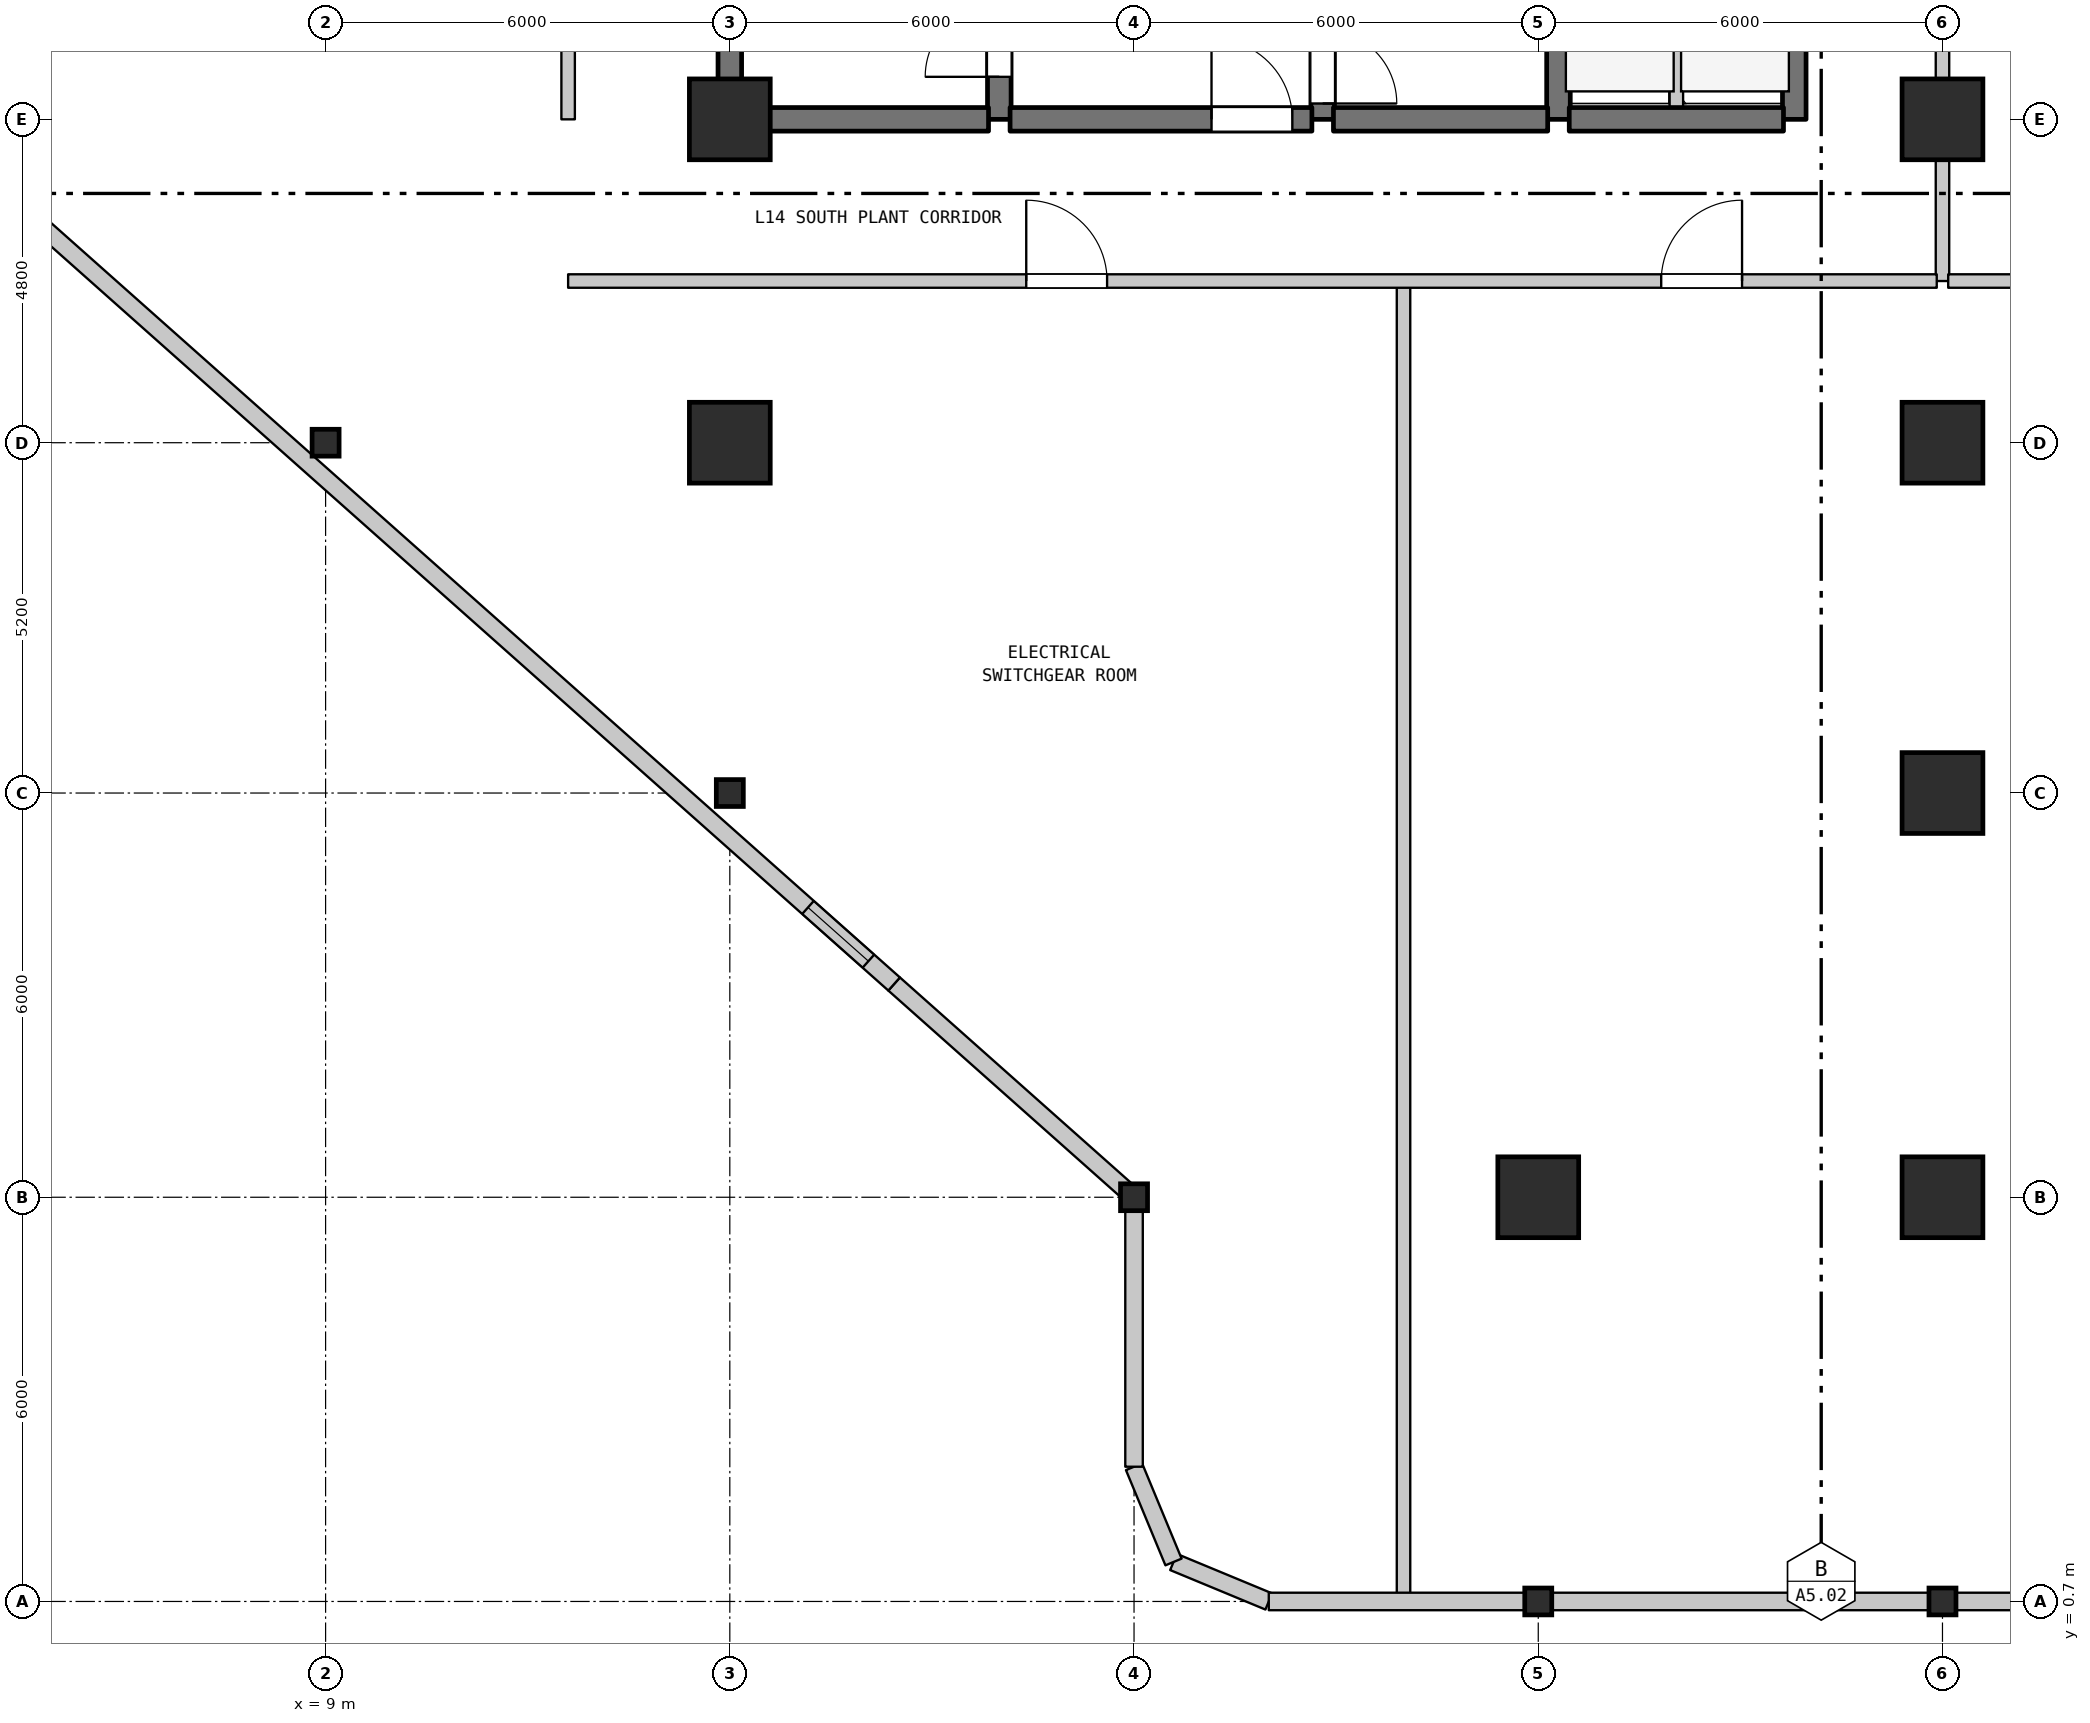
"""IFC4 building model, lengths in metres.
Left out: names, types, materials, properties, quantities, classifications, styles, units other than length and angle.
Written with IfcOpenShell. Run it as: python <this file> out.ifc"""

import sys

from ifc_helpers import new_model, si_unit, direction, frame, frame_2d, origin, origin_2d, place, context, subcontext, project, spatial, rectangle, i_section, extrude, element, fill, save


model = new_model("IFC4")
c1 = context("Model", 3, precision=1e-05, world=origin(), true_north=direction((0.0, 1.0)))
c2 = subcontext(c1, "Body", "Model", "MODEL_VIEW")
j1 = project(units=[si_unit("LENGTHUNIT", "METRE"), si_unit("PLANEANGLEUNIT", "RADIAN")], contexts=[c1])
p1 = place(None, origin())
s1 = spatial("IfcSite", under=j1, at=p1, CompositionType="ELEMENT")
p2 = place(p1, origin())
s2 = spatial("IfcBuilding", under=s1, at=p2, CompositionType="ELEMENT")
p3 = place(p2, frame((0.0, 0.0, 61.0)))
s3 = spatial("IfcBuildingStorey", under=s2, at=p3, CompositionType="ELEMENT", Elevation=61.0)
for number, where, z_axis, x_axis in (
    (1, (9.0, 17.9, 0.0), (0.0, 0.0, 1.0), (1.0, 0.0, 0.0)),
    (2, (15.0, 12.7, 0.0), (0.0, 0.0, 1.0), (1.0, 0.0, 0.0)),
):
    element("IfcColumn", number, at=place(p3, frame(where, z_axis=z_axis, x_axis=x_axis)), inside=s3, PredefinedType="COLUMN", context=c2, shape_type="SweptSolid", body=[
        extrude(i_section(OverallWidth=0.401, OverallDepth=0.399, WebThickness=0.025, FlangeThickness=0.04, FilletRadius=0.015, at=origin_2d()), origin(), (0.0, 0.0, 1.0), 4.6),
    ])
for number, where, z_axis, x_axis in (
    (3, (15.0, 17.9, 0.0), (0.0, 0.0, 1.0), (1.0, 0.0, 0.0)),
    (4, (15.0, 22.7, 0.0), (0.0, 0.0, 1.0), (1.0, 0.0, 0.0)),
):
    element("IfcColumn", number, at=place(p3, frame(where, z_axis=z_axis, x_axis=x_axis)), inside=s3, PredefinedType="COLUMN", context=c2, shape_type="SweptSolid", body=[
        extrude(rectangle(XDim=1.2, YDim=1.2, at=origin_2d()), origin(), (0.0, 0.0, 1.0), 4.6),
    ])
for number, where, z_axis, x_axis in (
    (5, (21.0, 6.7, 0.0), (0.0, 0.0, 1.0), (1.0, 0.0, 0.0)),
    (6, (27.0, 0.7, 0.0), (0.0, 0.0, 1.0), (1.0, 0.0, 0.0)),
):
    element("IfcColumn", number, at=place(p3, frame(where, z_axis=z_axis, x_axis=x_axis)), inside=s3, PredefinedType="COLUMN", context=c2, shape_type="SweptSolid", body=[
        extrude(i_section(OverallWidth=0.401, OverallDepth=0.399, WebThickness=0.025, FlangeThickness=0.04, FilletRadius=0.015, at=origin_2d()), origin(), (0.0, 0.0, 1.0), 4.6),
    ])
p4 = place(p3, frame((27.0, 6.7, 0.0), z_axis=(0.0, 0.0, 1.0), x_axis=(1.0, 0.0, 0.0)))
e7 = element("IfcColumn", 7, at=p4, inside=s3, PredefinedType="COLUMN", context=c2, shape_type="SweptSolid", body=[
    extrude(rectangle(XDim=1.2, YDim=1.2, at=origin_2d()), origin(), (0.0, 0.0, 1.0), 4.6),
])
p5 = place(p3, frame((33.0, 0.7, 0.0), z_axis=(0.0, 0.0, 1.0), x_axis=(1.0, 0.0, 0.0)))
e8 = element("IfcColumn", 8, at=p5, inside=s3, PredefinedType="COLUMN", context=c2, shape_type="SweptSolid", body=[
    extrude(i_section(OverallWidth=0.401, OverallDepth=0.399, WebThickness=0.025, FlangeThickness=0.04, FilletRadius=0.015, at=origin_2d()), origin(), (0.0, 0.0, 1.0), 4.6),
])
for number, where, z_axis, x_axis in (
    (9, (33.0, 6.7, 0.0), (0.0, 0.0, 1.0), (1.0, 0.0, 0.0)),
    (10, (33.0, 12.7, 0.0), (0.0, 0.0, 1.0), (1.0, 0.0, 0.0)),
    (11, (33.0, 17.9, 0.0), (0.0, 0.0, 1.0), (1.0, 0.0, 0.0)),
    (12, (33.0, 22.7, 0.0), (0.0, 0.0, 1.0), (1.0, 0.0, 0.0)),
):
    element("IfcColumn", number, at=place(p3, frame(where, z_axis=z_axis, x_axis=x_axis)), inside=s3, PredefinedType="COLUMN", context=c2, shape_type="SweptSolid", body=[
        extrude(rectangle(XDim=1.2, YDim=1.2, at=origin_2d()), origin(), (0.0, 0.0, 1.0), 4.6),
    ])
p6 = place(p3, frame((21.0, 6.7, 0.0), z_axis=(0.0, 0.0, 1.0), x_axis=(-0.74741780008, 0.664354297137, 0.0)))
e13 = element("IfcWall", 13, at=p6, inside=s3, PredefinedType="STANDARD", context=c2, shape_type="SweptSolid", body=[
    extrude(rectangle(XDim=4.764, YDim=0.26, at=frame_2d((2.382, 0.0))), origin(), (0.0, 0.0, 1.0), 3.88),
])
for number, where, z_axis, x_axis in (
    (14, (23.0, 0.7, 0.0), (0.0, 0.0, 1.0), (-0.924, 0.383, 0.0)),
    (15, (21.586, 1.286, 0.0), (0.0, 0.0, 1.0), (-0.383, 0.924, 0.0)),
):
    element("IfcWall", number, at=place(p3, frame(where, z_axis=z_axis, x_axis=x_axis)), inside=s3, PredefinedType="STANDARD", context=c2, shape_type="SweptSolid", body=[
        extrude(rectangle(XDim=1.531, YDim=0.26, at=frame_2d((0.765, 0.0))), origin(), (0.0, 0.0, 1.0), 4.28),
    ])
p7 = place(p3, frame((21.0, 2.7, 0.0), z_axis=(0.0, 0.0, 1.0), x_axis=(0.0, 1.0, 0.0)))
e16 = element("IfcWall", 16, at=p7, inside=s3, PredefinedType="STANDARD", context=c2, shape_type="SweptSolid", body=[
    extrude(rectangle(XDim=4.0, YDim=0.26, at=frame_2d((2.0, 0.0))), origin(), (0.0, 0.0, 1.0), 4.28),
])
p8 = place(p3, frame((12.6, 22.7, 0.0), z_axis=(0.0, 0.0, 1.0), x_axis=(0.0, 1.0, 0.0)))
e17 = element("IfcWall", 17, at=p8, inside=s3, PredefinedType="STANDARD", context=c2, shape_type="SweptSolid", body=[
    extrude(rectangle(XDim=15.2, YDim=0.2, at=frame_2d((7.6, 0.0))), origin(), (0.0, 0.0, 1.0), 4.28),
])
p9 = place(p8, frame((7.0, 0.0, 0.0)))
e18 = element("IfcOpeningElement", 18, at=p9, cuts=e17, PredefinedType="OPENING", context=c2, shape_type="SweptSolid", body=[
    extrude(rectangle(XDim=1.2, YDim=2.2, at=frame_2d((0.6, 1.1))), frame((0.0, 0.11, 0.0), z_axis=(0.0, -1.0, 0.0), x_axis=(1.0, 0.0, 0.0)), (0.0, 0.0, 1.0), 0.22),
])
p10 = place(p3, frame((15.0, 22.7, 0.0), z_axis=(0.0, 0.0, 1.0), x_axis=(0.0, 1.0, 0.0)))
e19 = element("IfcWall", 19, at=p10, inside=s3, PredefinedType="SHEAR", context=c2, shape_type="SweptSolid", body=[
    extrude(rectangle(XDim=6.8, YDim=0.35, at=frame_2d((3.4, 0.0))), origin(), (0.0, 0.0, 1.0), 4.28),
])
p11 = place(p3, frame((19.0, 22.7, 0.0), z_axis=(0.0, 0.0, 1.0), x_axis=(0.0, 1.0, 0.0)))
e20 = element("IfcWall", 20, at=p11, inside=s3, PredefinedType="SHEAR", context=c2, shape_type="SweptSolid", body=[
    extrude(rectangle(XDim=5.5, YDim=0.35, at=frame_2d((2.75, 0.0))), origin(), (0.0, 0.0, 1.0), 4.28),
])
p12 = place(p11, frame((0.631, 0.0, 0.0)))
e21 = element("IfcOpeningElement", 21, at=p12, cuts=e20, PredefinedType="OPENING", context=c2, shape_type="SweptSolid", body=[
    extrude(rectangle(XDim=1.1, YDim=2.15, at=frame_2d((0.55, 1.075))), frame((0.0, 0.185, 0.0), z_axis=(0.0, -1.0, 0.0), x_axis=(1.0, 0.0, 0.0)), (0.0, 0.0, 1.0), 0.37),
])
p13 = place(p3, frame((23.8, 22.7, 0.0), z_axis=(0.0, 0.0, 1.0), x_axis=(0.0, 1.0, 0.0)))
e22 = element("IfcWall", 22, at=p13, inside=s3, PredefinedType="SHEAR", context=c2, shape_type="SweptSolid", body=[
    extrude(rectangle(XDim=5.5, YDim=0.35, at=frame_2d((2.75, 0.0))), origin(), (0.0, 0.0, 1.0), 4.28),
])
p14 = place(p13, frame((0.235, 0.0, 0.0)))
e23 = element("IfcOpeningElement", 23, at=p14, cuts=e22, PredefinedType="OPENING", context=c2, shape_type="SweptSolid", body=[
    extrude(rectangle(XDim=1.1, YDim=2.15, at=frame_2d((0.55, 1.075))), frame((0.0, 0.185, 0.0), z_axis=(0.0, -1.0, 0.0), x_axis=(1.0, 0.0, 0.0)), (0.0, 0.0, 1.0), 0.37),
])
p15 = place(p3, frame((25.0, 0.71, 0.0), z_axis=(0.0, 0.0, 1.0), x_axis=(0.0, 1.0, 0.0)))
e24 = element("IfcWall", 24, at=p15, inside=s3, PredefinedType="STANDARD", context=c2, shape_type="SweptSolid", body=[
    extrude(rectangle(XDim=19.59, YDim=0.2, at=frame_2d((9.795, 0.0))), origin(), (0.0, 0.0, 1.0), 4.28),
])
p16 = place(p3, frame((27.3, 22.7, 0.0), z_axis=(0.0, 0.0, 1.0), x_axis=(0.0, 1.0, 0.0)))
e25 = element("IfcWall", 25, at=p16, inside=s3, PredefinedType="SHEAR", context=c2, shape_type="SweptSolid", body=[
    extrude(rectangle(XDim=2.9, YDim=0.35, at=frame_2d((1.45, 0.0))), origin(), (0.0, 0.0, 1.0), 4.28),
])
p17 = place(p3, frame((29.05, 22.7, 0.0), z_axis=(0.0, 0.0, 1.0), x_axis=(0.0, 1.0, 0.0)))
e26 = element("IfcWall", 26, at=p17, inside=s3, PredefinedType="STANDARD", context=c2, shape_type="SweptSolid", body=[
    extrude(rectangle(XDim=2.9, YDim=0.2, at=frame_2d((1.45, 0.0))), origin(), (0.0, 0.0, 1.0), 4.28),
])
p18 = place(p3, frame((30.8, 22.7, 0.0), z_axis=(0.0, 0.0, 1.0), x_axis=(0.0, 1.0, 0.0)))
e27 = element("IfcWall", 27, at=p18, inside=s3, PredefinedType="SHEAR", context=c2, shape_type="SweptSolid", body=[
    extrude(rectangle(XDim=2.9, YDim=0.35, at=frame_2d((1.45, 0.0))), origin(), (0.0, 0.0, 1.0), 4.28),
])
p19 = place(p3, frame((33.0, 20.3, 0.0), z_axis=(0.0, 0.0, 1.0), x_axis=(0.0, 1.0, 0.0)))
e28 = element("IfcWall", 28, at=p19, inside=s3, PredefinedType="STANDARD", context=c2, shape_type="SweptSolid", body=[
    extrude(rectangle(XDim=8.2, YDim=0.2, at=frame_2d((4.1, 0.0))), origin(), (0.0, 0.0, 1.0), 3.78),
])
p20 = place(p19, frame((4.6, 0.0, 0.0)))
e29 = element("IfcOpeningElement", 29, at=p20, cuts=e28, PredefinedType="OPENING", context=c2, shape_type="SweptSolid", body=[
    extrude(rectangle(XDim=1.2, YDim=2.2, at=frame_2d((0.6, 1.1))), frame((0.0, 0.11, 0.0), z_axis=(0.0, -1.0, 0.0), x_axis=(1.0, 0.0, 0.0)), (0.0, 0.0, 1.0), 0.22),
])
p21 = place(p3, frame((12.6, 20.3, 0.0), z_axis=(0.0, 0.0, 1.0), x_axis=(1.0, 0.0, 0.0)))
e30 = element("IfcWall", 30, at=p21, inside=s3, PredefinedType="STANDARD", context=c2, shape_type="SweptSolid", body=[
    extrude(rectangle(XDim=20.315, YDim=0.2, at=frame_2d((10.157, 0.0))), origin(), (0.0, 0.0, 1.0), 4.28),
])
p22 = place(p21, frame((6.8, 0.0, 0.0)))
e31 = element("IfcOpeningElement", 31, at=p22, cuts=e30, PredefinedType="OPENING", context=c2, shape_type="SweptSolid", body=[
    extrude(rectangle(XDim=1.2, YDim=2.2, at=frame_2d((0.6, 1.1))), frame((0.0, 0.11, 0.0), z_axis=(0.0, -1.0, 0.0), x_axis=(1.0, 0.0, 0.0)), (0.0, 0.0, 1.0), 0.22),
])
p23 = place(p21, frame((16.225, 0.0, 0.0)))
e32 = element("IfcOpeningElement", 32, at=p23, cuts=e30, PredefinedType="OPENING", context=c2, shape_type="SweptSolid", body=[
    extrude(rectangle(XDim=1.2, YDim=2.2, at=frame_2d((0.6, 1.1))), frame((0.0, 0.11, 0.0), z_axis=(0.0, -1.0, 0.0), x_axis=(1.0, 0.0, 0.0)), (0.0, 0.0, 1.0), 0.22),
])
p24 = place(p3, frame((33.085, 20.3, 0.0), z_axis=(0.0, 0.0, 1.0), x_axis=(1.0, 0.0, 0.0)))
e33 = element("IfcWall", 33, at=p24, inside=s3, PredefinedType="STANDARD", context=c2, shape_type="SweptSolid", body=[
    extrude(rectangle(XDim=36.905, YDim=0.2, at=frame_2d((18.453, 0.0))), origin(), (0.0, 0.0, 1.0), 4.28),
])
p25 = place(p3, frame((15.16, 22.7, 0.0), z_axis=(0.0, 0.0, 1.0), x_axis=(1.0, 0.0, 0.0)))
e34 = element("IfcWall", 34, at=p25, inside=s3, PredefinedType="SHEAR", context=c2, shape_type="SweptSolid", body=[
    extrude(rectangle(XDim=3.68, YDim=0.35, at=frame_2d((1.84, 0.0))), origin(), (0.0, 0.0, 1.0), 4.28),
])
p26 = place(p3, frame((19.16, 22.7, 0.0), z_axis=(0.0, 0.0, 1.0), x_axis=(1.0, 0.0, 0.0)))
e35 = element("IfcWall", 35, at=p26, inside=s3, PredefinedType="SHEAR", context=c2, shape_type="SweptSolid", body=[
    extrude(rectangle(XDim=4.48, YDim=0.35, at=frame_2d((2.24, 0.0))), origin(), (0.0, 0.0, 1.0), 4.28),
])
p27 = place(p26, frame((2.99, 0.0, 0.0)))
e36 = element("IfcOpeningElement", 36, at=p27, cuts=e35, PredefinedType="OPENING", context=c2, shape_type="SweptSolid", body=[
    extrude(rectangle(XDim=1.2, YDim=2.2, at=frame_2d((0.6, 1.1))), frame((0.0, 0.185, 0.0), z_axis=(0.0, -1.0, 0.0), x_axis=(1.0, 0.0, 0.0)), (0.0, 0.0, 1.0), 0.37),
])
for number, where, z_axis, x_axis in (
    (37, (23.96, 22.7, 0.0), (0.0, 0.0, 1.0), (1.0, 0.0, 0.0)),
    (38, (27.46, 22.7, 0.0), (0.0, 0.0, 1.0), (1.0, 0.0, 0.0)),
):
    element("IfcWall", number, at=place(p3, frame(where, z_axis=z_axis, x_axis=x_axis)), inside=s3, PredefinedType="SHEAR", context=c2, shape_type="SweptSolid", body=[
        extrude(rectangle(XDim=3.18, YDim=0.35, at=frame_2d((1.59, 0.0))), origin(), (0.0, 0.0, 1.0), 4.28),
    ])
p28 = place(p3, frame((17.439, 9.865, 0.0), z_axis=(0.0, 0.0, 1.0), x_axis=(-0.747407065455, 0.664366373703, 0.0)))
e39 = element("IfcWall", 39, at=p28, inside=s3, PredefinedType="STANDARD", context=c2, shape_type="SweptSolid", body=[
    extrude(rectangle(XDim=17.934, YDim=0.26, at=frame_2d((8.967, 0.0))), origin(), (0.0, 0.0, 1.0), 4.28),
])
p29 = place(p28, frame((0.51, 0.0, 1.1)))
e40 = element("IfcOpeningElement", 40, at=p29, cuts=e39, PredefinedType="OPENING", context=c2, shape_type="SweptSolid", body=[
    extrude(rectangle(XDim=1.2, YDim=1.4, at=frame_2d((0.6, 0.7))), frame((0.0, 0.14, 0.0), z_axis=(0.0, -1.0, 0.0), x_axis=(1.0, 0.0, 0.0)), (0.0, 0.0, 1.0), 0.28),
])
p30 = place(p3, frame((45.0, 0.7, 0.0), z_axis=(0.0, 0.0, 1.0), x_axis=(-1.0, 0.0, 0.0)))
e41 = element("IfcWall", 41, at=p30, inside=s3, PredefinedType="STANDARD", context=c2, shape_type="SweptSolid", body=[
    extrude(rectangle(XDim=18.0, YDim=0.26, at=frame_2d((9.0, 0.0))), origin(), (0.0, 0.0, 1.0), 3.78),
])
p31 = place(p30, frame((1.223, 0.0, 1.1)))
e42 = element("IfcOpeningElement", 42, at=p31, cuts=e41, PredefinedType="OPENING", context=c2, shape_type="SweptSolid", body=[
    extrude(rectangle(XDim=1.2, YDim=1.4, at=frame_2d((0.6, 0.7))), frame((0.0, 0.14, 0.0), z_axis=(0.0, -1.0, 0.0), x_axis=(1.0, 0.0, 0.0)), (0.0, 0.0, 1.0), 0.28),
])
p32 = place(p30, frame((8.624, 0.0, 1.1)))
e43 = element("IfcOpeningElement", 43, at=p32, cuts=e41, PredefinedType="OPENING", context=c2, shape_type="SweptSolid", body=[
    extrude(rectangle(XDim=1.2, YDim=1.4, at=frame_2d((0.6, 0.7))), frame((0.0, 0.14, 0.0), z_axis=(0.0, -1.0, 0.0), x_axis=(1.0, 0.0, 0.0)), (0.0, 0.0, 1.0), 0.28),
])
p33 = place(p3, frame((27.0, 0.7, 0.0), z_axis=(0.0, 0.0, 1.0), x_axis=(-1.0, 0.0, 0.0)))
e44 = element("IfcWall", 44, at=p33, inside=s3, PredefinedType="STANDARD", context=c2, shape_type="SweptSolid", body=[
    extrude(rectangle(XDim=4.0, YDim=0.26, at=frame_2d((2.0, 0.0))), origin(), (0.0, 0.0, 1.0), 4.28),
])
p34 = place(p29, origin())
e45 = element("IfcWindow", 45, at=p34, inside=s3, PartitioningType="SINGLE_PANEL", PredefinedType="WINDOW", context=c2, shape_type="SweptSolid", body=[
    extrude(rectangle(XDim=1.2, YDim=1.4, at=frame_2d((0.6, 0.7))), frame((0.0, 0.03, 0.0), z_axis=(0.0, -1.0, 0.0), x_axis=(1.0, 0.0, 0.0)), (0.0, 0.0, 1.0), 0.06),
])
fill(e40, e45)
p35 = place(p12, origin())
e46 = element("IfcDoor", 46, at=p35, inside=s3, OperationType="SINGLE_SWING_LEFT", PredefinedType="DOOR", context=c2, shape_type="SweptSolid", body=[
    extrude(rectangle(XDim=1.1, YDim=2.15, at=frame_2d((0.55, 1.075))), frame((0.0, 0.025, 0.0), z_axis=(0.0, -1.0, 0.0), x_axis=(1.0, 0.0, 0.0)), (0.0, 0.0, 1.0), 0.05),
])
fill(e21, e46)
p36 = place(p14, frame((1.1, 0.0, 0.0), z_axis=(0.0, 0.0, 1.0), x_axis=(-1.0, 0.0, 0.0)))
e47 = element("IfcDoor", 47, at=p36, inside=s3, OperationType="SINGLE_SWING_LEFT", PredefinedType="DOOR", context=c2, shape_type="SweptSolid", body=[
    extrude(rectangle(XDim=1.1, YDim=2.15, at=frame_2d((0.55, 1.075))), frame((0.0, 0.025, 0.0), z_axis=(0.0, -1.0, 0.0), x_axis=(1.0, 0.0, 0.0)), (0.0, 0.0, 1.0), 0.05),
])
fill(e23, e47)
p37 = place(p22, origin())
e48 = element("IfcDoor", 48, at=p37, inside=s3, OperationType="SINGLE_SWING_LEFT", PredefinedType="DOOR", context=c2, shape_type="SweptSolid", body=[
    extrude(rectangle(XDim=1.2, YDim=2.2, at=frame_2d((0.6, 1.1))), frame((0.0, 0.025, 0.0), z_axis=(0.0, -1.0, 0.0), x_axis=(1.0, 0.0, 0.0)), (0.0, 0.0, 1.0), 0.05),
])
fill(e31, e48)
p38 = place(p23, origin())
e49 = element("IfcDoor", 49, at=p38, inside=s3, OperationType="SINGLE_SWING_RIGHT", PredefinedType="DOOR", context=c2, shape_type="SweptSolid", body=[
    extrude(rectangle(XDim=1.2, YDim=2.2, at=frame_2d((0.6, 1.1))), frame((0.0, 0.025, 0.0), z_axis=(0.0, -1.0, 0.0), x_axis=(1.0, 0.0, 0.0)), (0.0, 0.0, 1.0), 0.05),
])
fill(e32, e49)
p39 = place(p27, origin())
e50 = element("IfcDoor", 50, at=p39, inside=s3, OperationType="SINGLE_SWING_LEFT", PredefinedType="DOOR", context=c2, shape_type="SweptSolid", body=[
    extrude(rectangle(XDim=1.2, YDim=2.2, at=frame_2d((0.6, 1.1))), frame((0.0, 0.025, 0.0), z_axis=(0.0, -1.0, 0.0), x_axis=(1.0, 0.0, 0.0)), (0.0, 0.0, 1.0), 0.05),
])
fill(e36, e50)
save(model, sys.argv[1])
